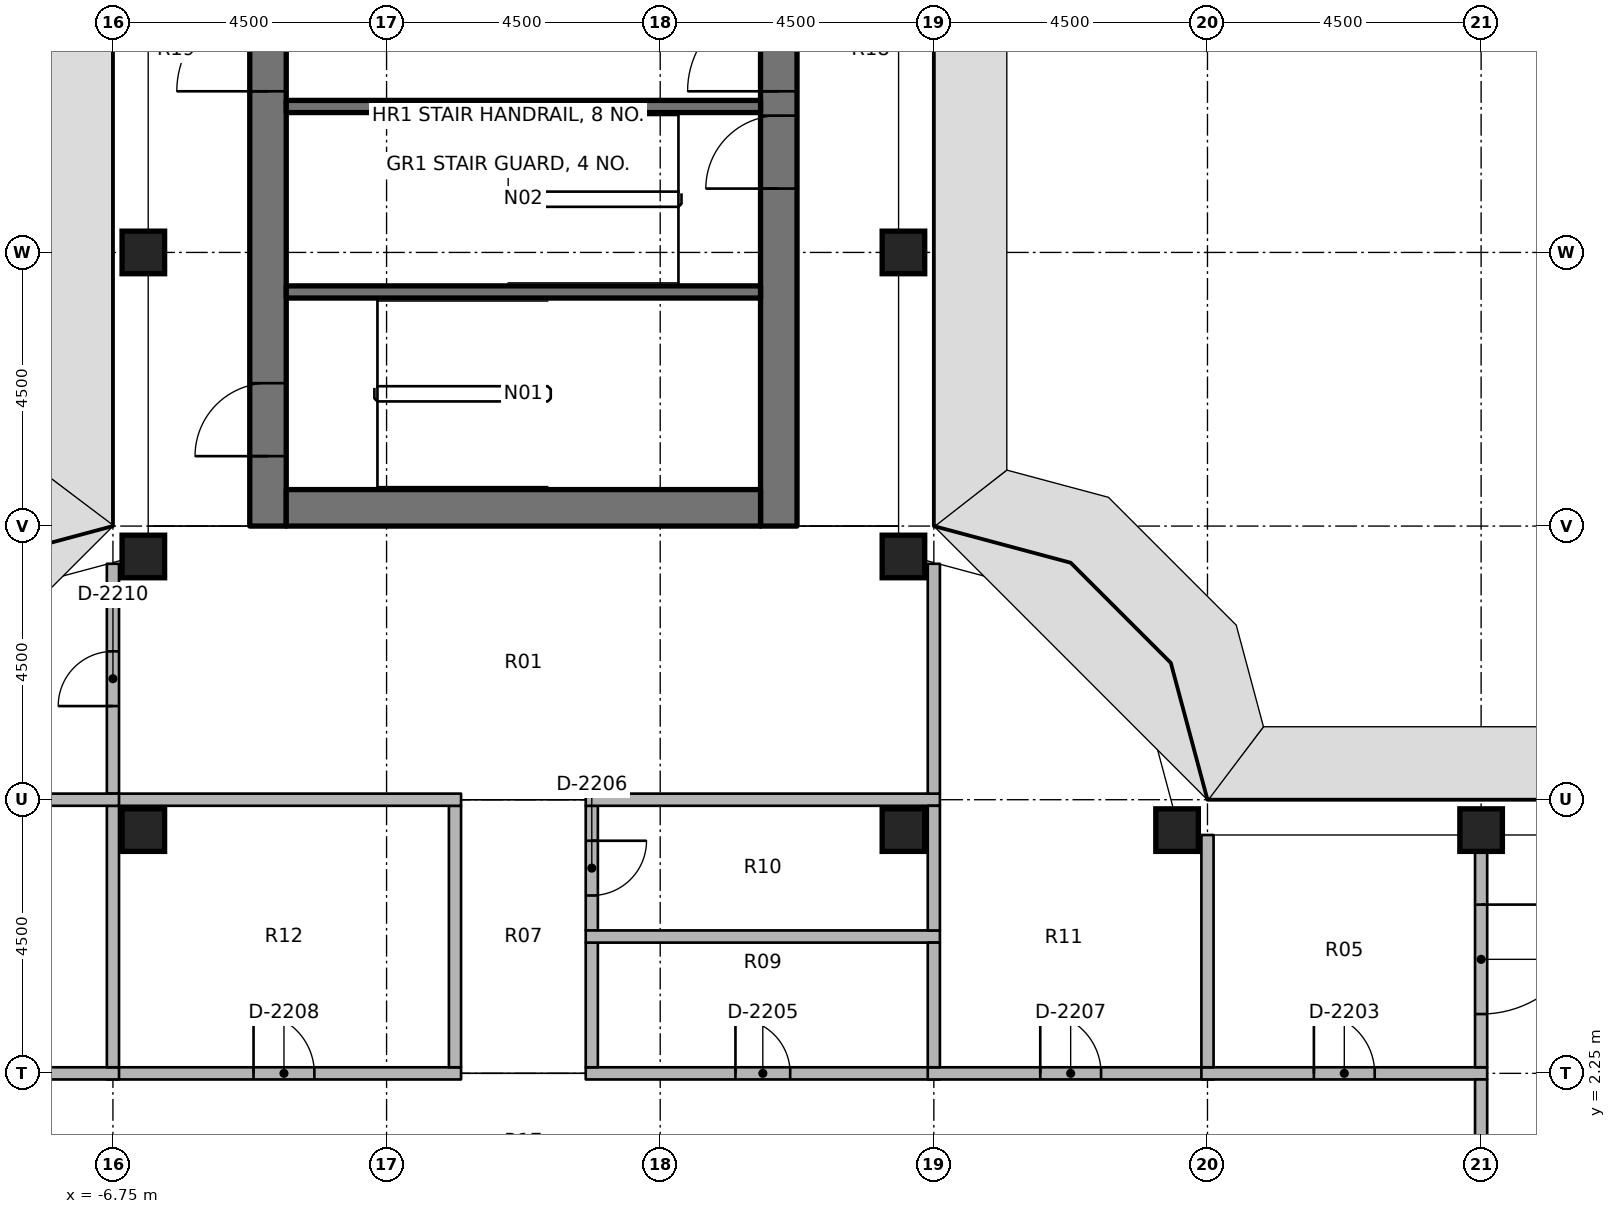
"""IFC4 building model, lengths in metres.
Left out: names, types, materials, properties, quantities, classifications, styles, units other than length and angle.
Written with IfcOpenShell. Run it as: python <this file> out.ifc"""

import sys

from ifc_helpers import new_model, si_unit, direction, frame, frame_2d, origin, origin_2d, place, context, subcontext, project, spatial, rectangle, extrude, element, fill, save


model = new_model("IFC4")
c1 = context("Model", 3, precision=1e-05, world=origin(), true_north=direction((0.0, 1.0)))
c2 = subcontext(c1, "Body", "Model", "MODEL_VIEW")
j1 = project(units=[si_unit("LENGTHUNIT", "METRE"), si_unit("PLANEANGLEUNIT", "RADIAN")], contexts=[c1])
p1 = place(None, origin())
s1 = spatial("IfcSite", under=j1, at=p1, CompositionType="ELEMENT")
p2 = place(p1, origin())
s2 = spatial("IfcBuilding", under=s1, at=p2, CompositionType="ELEMENT")
p3 = place(p2, frame((0.0, 0.0, 206.8)))
s3 = spatial("IfcBuildingStorey", under=s2, at=p3, CompositionType="ELEMENT", Elevation=206.8)
for number, where, z_axis, x_axis in (
    (1, (-6.25, 6.25, 0.0), (0.0, 0.0, 1.0), (1.0, 0.0, 0.0)),
    (2, (-6.25, 10.75, 0.0), (0.0, 0.0, 1.0), (1.0, 0.0, 0.0)),
    (3, (-6.25, 15.75, 0.0), (0.0, 0.0, 1.0), (1.0, 0.0, 0.0)),
    (4, (6.25, 6.25, 0.0), (0.0, 0.0, 1.0), (1.0, 0.0, 0.0)),
    (5, (6.25, 10.75, 0.0), (0.0, 0.0, 1.0), (1.0, 0.0, 0.0)),
    (6, (6.25, 15.75, 0.0), (0.0, 0.0, 1.0), (1.0, 0.0, 0.0)),
    (7, (10.75, 6.25, 0.0), (0.0, 0.0, 1.0), (1.0, 0.0, 0.0)),
    (8, (15.75, 6.25, 0.0), (0.0, 0.0, 1.0), (1.0, 0.0, 0.0)),
):
    element("IfcColumn", number, at=place(p3, frame(where, z_axis=z_axis, x_axis=x_axis)), inside=s3, PredefinedType="COLUMN", context=c2, shape_type="SweptSolid", body=[
        extrude(rectangle(XDim=0.7, YDim=0.7, at=origin_2d()), origin(), (0.0, 0.0, 1.0), 3.65),
    ])
p4 = place(p3, frame((-4.2, 11.25, 0.0), z_axis=(0.0, 0.0, 1.0), x_axis=(0.0, 1.0, 0.0)))
e9 = element("IfcWall", 9, at=p4, inside=s3, PredefinedType="SHEAR", context=c2, shape_type="SweptSolid", body=[
    extrude(rectangle(XDim=15.0, YDim=0.6, at=frame_2d((7.5, 0.0))), origin(), (0.0, 0.0, 1.0), 3.8),
])
p5 = place(p4, frame((7.15, 0.0, 0.0)))
e10 = element("IfcOpeningElement", 10, at=p5, cuts=e9, PredefinedType="OPENING", context=c2, shape_type="SweptSolid", body=[
    extrude(rectangle(XDim=1.5, YDim=2.3, at=frame_2d((0.75, 1.15))), frame((0.0, 0.31, 0.0), z_axis=(0.0, -1.0, 0.0), x_axis=(1.0, 0.0, 0.0)), (0.0, 0.0, 1.0), 0.62),
])
p6 = place(p4, frame((13.9, 0.0, 0.0)))
e11 = element("IfcOpeningElement", 11, at=p6, cuts=e9, PredefinedType="OPENING", context=c2, shape_type="SweptSolid", body=[
    extrude(rectangle(XDim=0.9, YDim=2.1, at=frame_2d((0.45, 1.05))), frame((0.0, 0.31, 0.0), z_axis=(0.0, -1.0, 0.0), x_axis=(1.0, 0.0, 0.0)), (0.0, 0.0, 1.0), 0.62),
])
p7 = place(p4, frame((1.15, 0.0, 0.0)))
e12 = element("IfcOpeningElement", 12, at=p7, cuts=e9, PredefinedType="OPENING", context=c2, shape_type="SweptSolid", body=[
    extrude(rectangle(XDim=1.2, YDim=2.1, at=frame_2d((0.6, 1.05))), frame((0.0, 0.31, 0.0), z_axis=(0.0, -1.0, 0.0), x_axis=(1.0, 0.0, 0.0)), (0.0, 0.0, 1.0), 0.62),
])
p8 = place(p3, frame((4.2, 11.25, 0.0), z_axis=(0.0, 0.0, 1.0), x_axis=(0.0, 1.0, 0.0)))
e13 = element("IfcWall", 13, at=p8, inside=s3, PredefinedType="SHEAR", context=c2, shape_type="SweptSolid", body=[
    extrude(rectangle(XDim=15.0, YDim=0.6, at=frame_2d((7.5, 0.0))), origin(), (0.0, 0.0, 1.0), 3.8),
])
p9 = place(p8, frame((7.15, 0.0, 0.0)))
e14 = element("IfcOpeningElement", 14, at=p9, cuts=e13, PredefinedType="OPENING", context=c2, shape_type="SweptSolid", body=[
    extrude(rectangle(XDim=1.5, YDim=2.3, at=frame_2d((0.75, 1.15))), frame((0.0, 0.31, 0.0), z_axis=(0.0, -1.0, 0.0), x_axis=(1.0, 0.0, 0.0)), (0.0, 0.0, 1.0), 0.62),
])
p10 = place(p8, frame((5.55, 0.0, 0.0)))
e15 = element("IfcOpeningElement", 15, at=p10, cuts=e13, PredefinedType="OPENING", context=c2, shape_type="SweptSolid", body=[
    extrude(rectangle(XDim=1.2, YDim=2.1, at=frame_2d((0.6, 1.05))), frame((0.0, 0.31, 0.0), z_axis=(0.0, -1.0, 0.0), x_axis=(1.0, 0.0, 0.0)), (0.0, 0.0, 1.0), 0.62),
])
p11 = place(p3, frame((-3.9, 11.55, 0.0), z_axis=(0.0, 0.0, 1.0), x_axis=(1.0, 0.0, 0.0)))
e16 = element("IfcWall", 16, at=p11, inside=s3, PredefinedType="SHEAR", context=c2, shape_type="SweptSolid", body=[
    extrude(rectangle(XDim=7.8, YDim=0.6, at=frame_2d((3.9, 0.0))), origin(), (0.0, 0.0, 1.0), 3.8),
])
for number, where, z_axis, x_axis in (
    (17, (-3.9, 18.15, 0.0), (0.0, 0.0, 1.0), (1.0, 0.0, 0.0)),
    (18, (-3.9, 15.1, 0.0), (0.0, 0.0, 1.0), (1.0, 0.0, 0.0)),
):
    element("IfcWall", number, at=place(p3, frame(where, z_axis=z_axis, x_axis=x_axis)), inside=s3, PredefinedType="SHEAR", context=c2, shape_type="SweptSolid", body=[
        extrude(rectangle(XDim=7.8, YDim=0.2, at=frame_2d((3.9, 0.0))), origin(), (0.0, 0.0, 1.0), 3.65),
    ])
p12 = place(p3, frame((1.025, 2.25, 0.0), z_axis=(0.0, 0.0, 1.0), x_axis=(1.0, 0.0, 0.0)))
e19 = element("IfcWall", 19, at=p12, inside=s3, PredefinedType="PARTITIONING", context=c2, shape_type="SweptSolid", body=[
    extrude(rectangle(XDim=5.825, YDim=0.2, at=frame_2d((2.913, 0.0))), origin(), (0.0, 0.0, 1.0), 2.75),
])
p13 = place(p12, frame((2.462, 0.0, 0.0)))
e20 = element("IfcOpeningElement", 20, at=p13, cuts=e19, PredefinedType="OPENING", context=c2, shape_type="SweptSolid", body=[
    extrude(rectangle(XDim=0.9, YDim=2.1, at=frame_2d((0.45, 1.05))), frame((0.0, 0.11, 0.0), z_axis=(0.0, -1.0, 0.0), x_axis=(1.0, 0.0, 0.0)), (0.0, 0.0, 1.0), 0.22),
])
p14 = place(p3, frame((6.65, 2.25, 0.0), z_axis=(0.0, 0.0, 1.0), x_axis=(1.0, 0.0, 0.0)))
e21 = element("IfcWall", 21, at=p14, inside=s3, PredefinedType="PARTITIONING", context=c2, shape_type="SweptSolid", body=[
    extrude(rectangle(XDim=4.7, YDim=0.2, at=frame_2d((2.35, 0.0))), origin(), (0.0, 0.0, 1.0), 2.75),
])
p15 = place(p14, frame((1.85, 0.0, 0.0)))
e22 = element("IfcOpeningElement", 22, at=p15, cuts=e21, PredefinedType="OPENING", context=c2, shape_type="SweptSolid", body=[
    extrude(rectangle(XDim=1.0, YDim=2.1, at=frame_2d((0.5, 1.05))), frame((0.0, 0.11, 0.0), z_axis=(0.0, -1.0, 0.0), x_axis=(1.0, 0.0, 0.0)), (0.0, 0.0, 1.0), 0.22),
])
p16 = place(p3, frame((-6.85, 2.25, 0.0), z_axis=(0.0, 0.0, 1.0), x_axis=(1.0, 0.0, 0.0)))
e23 = element("IfcWall", 23, at=p16, inside=s3, PredefinedType="PARTITIONING", context=c2, shape_type="SweptSolid", body=[
    extrude(rectangle(XDim=5.825, YDim=0.2, at=frame_2d((2.913, 0.0))), origin(), (0.0, 0.0, 1.0), 2.75),
])
p17 = place(p16, frame((2.413, 0.0, 0.0)))
e24 = element("IfcOpeningElement", 24, at=p17, cuts=e23, PredefinedType="OPENING", context=c2, shape_type="SweptSolid", body=[
    extrude(rectangle(XDim=1.0, YDim=2.1, at=frame_2d((0.5, 1.05))), frame((0.0, 0.11, 0.0), z_axis=(0.0, -1.0, 0.0), x_axis=(1.0, 0.0, 0.0)), (0.0, 0.0, 1.0), 0.22),
])
p18 = place(p3, frame((-11.35, 2.25, 0.0), z_axis=(0.0, 0.0, 1.0), x_axis=(1.0, 0.0, 0.0)))
e25 = element("IfcWall", 25, at=p18, inside=s3, PredefinedType="PARTITIONING", context=c2, shape_type="SweptSolid", body=[
    extrude(rectangle(XDim=4.7, YDim=0.2, at=frame_2d((2.35, 0.0))), origin(), (0.0, 0.0, 1.0), 2.75),
])
p19 = place(p18, frame((1.85, 0.0, 0.0)))
e26 = element("IfcOpeningElement", 26, at=p19, cuts=e25, PredefinedType="OPENING", context=c2, shape_type="SweptSolid", body=[
    extrude(rectangle(XDim=1.0, YDim=2.1, at=frame_2d((0.5, 1.05))), frame((0.0, 0.11, 0.0), z_axis=(0.0, -1.0, 0.0), x_axis=(1.0, 0.0, 0.0)), (0.0, 0.0, 1.0), 0.22),
])
p20 = place(p3, frame((11.15, 2.25, 0.0), z_axis=(0.0, 0.0, 1.0), x_axis=(1.0, 0.0, 0.0)))
e27 = element("IfcWall", 27, at=p20, inside=s3, PredefinedType="PARTITIONING", context=c2, shape_type="SweptSolid", body=[
    extrude(rectangle(XDim=4.7, YDim=0.2, at=frame_2d((2.35, 0.0))), origin(), (0.0, 0.0, 1.0), 2.75),
])
p21 = place(p20, frame((1.85, 0.0, 0.0)))
e28 = element("IfcOpeningElement", 28, at=p21, cuts=e27, PredefinedType="OPENING", context=c2, shape_type="SweptSolid", body=[
    extrude(rectangle(XDim=1.0, YDim=2.1, at=frame_2d((0.5, 1.05))), frame((0.0, 0.11, 0.0), z_axis=(0.0, -1.0, 0.0), x_axis=(1.0, 0.0, 0.0)), (0.0, 0.0, 1.0), 0.22),
])
for number, where, z_axis, x_axis in (
    (29, (15.75, 0.1, 0.0), (0.0, 0.0, 1.0), (0.0, 1.0, 0.0)),
    (30, (1.125, 2.35, 0.0), (0.0, 0.0, 1.0), (0.0, 1.0, 0.0)),
):
    element("IfcWall", number, at=place(p3, frame(where, z_axis=z_axis, x_axis=x_axis)), inside=s3, PredefinedType="PARTITIONING", context=c2, shape_type="SweptSolid", body=[
        extrude(rectangle(XDim=2.05, YDim=0.2, at=frame_2d((1.025, 0.0))), origin(), (0.0, 0.0, 1.0), 2.75),
    ])
p22 = place(p3, frame((1.125, 6.65, 0.0), z_axis=(0.0, 0.0, 1.0), x_axis=(0.0, -1.0, 0.0)))
e31 = element("IfcWall", 31, at=p22, inside=s3, PredefinedType="PARTITIONING", context=c2, shape_type="SweptSolid", body=[
    extrude(rectangle(XDim=2.05, YDim=0.2, at=frame_2d((1.025, 0.0))), origin(), (0.0, 0.0, 1.0), 2.75),
])
p23 = place(p22, frame((0.575, 0.0, 0.0)))
e32 = element("IfcOpeningElement", 32, at=p23, cuts=e31, PredefinedType="OPENING", context=c2, shape_type="SweptSolid", body=[
    extrude(rectangle(XDim=0.9, YDim=2.1, at=frame_2d((0.45, 1.05))), frame((0.0, 0.11, 0.0), z_axis=(0.0, -1.0, 0.0), x_axis=(1.0, 0.0, 0.0)), (0.0, 0.0, 1.0), 0.22),
])
p24 = place(p3, frame((-1.125, 2.35, 0.0), z_axis=(0.0, 0.0, 1.0), x_axis=(0.0, 1.0, 0.0)))
e33 = element("IfcWall", 33, at=p24, inside=s3, PredefinedType="PARTITIONING", context=c2, shape_type="SweptSolid", body=[
    extrude(rectangle(XDim=4.3, YDim=0.2, at=frame_2d((2.15, 0.0))), origin(), (0.0, 0.0, 1.0), 2.75),
])
p25 = place(p3, frame((1.025, 6.75, 0.0), z_axis=(0.0, 0.0, 1.0), x_axis=(1.0, 0.0, 0.0)))
e34 = element("IfcWall", 34, at=p25, inside=s3, PredefinedType="PARTITIONING", context=c2, shape_type="SweptSolid", body=[
    extrude(rectangle(XDim=5.825, YDim=0.2, at=frame_2d((2.913, 0.0))), origin(), (0.0, 0.0, 1.0), 2.75),
])
p26 = place(p3, frame((6.75, 6.85, 0.0), z_axis=(0.0, 0.0, 1.0), x_axis=(0.0, 1.0, 0.0)))
e35 = element("IfcWall", 35, at=p26, inside=s3, PredefinedType="PARTITIONING", context=c2, shape_type="SweptSolid", body=[
    extrude(rectangle(XDim=3.78, YDim=0.2, at=frame_2d((1.89, 0.0))), origin(), (0.0, 0.0, 1.0), 2.75),
])
p27 = place(p3, frame((-6.85, 6.75, 0.0), z_axis=(0.0, 0.0, 1.0), x_axis=(1.0, 0.0, 0.0)))
e36 = element("IfcWall", 36, at=p27, inside=s3, PredefinedType="PARTITIONING", context=c2, shape_type="SweptSolid", body=[
    extrude(rectangle(XDim=5.825, YDim=0.2, at=frame_2d((2.913, 0.0))), origin(), (0.0, 0.0, 1.0), 2.75),
])
p28 = place(p3, frame((-6.75, 6.85, 0.0), z_axis=(0.0, 0.0, 1.0), x_axis=(0.0, 1.0, 0.0)))
e37 = element("IfcWall", 37, at=p28, inside=s3, PredefinedType="PARTITIONING", context=c2, shape_type="SweptSolid", body=[
    extrude(rectangle(XDim=3.78, YDim=0.2, at=frame_2d((1.89, 0.0))), origin(), (0.0, 0.0, 1.0), 2.75),
])
p29 = place(p28, frame((1.44, 0.0, 0.0)))
e38 = element("IfcOpeningElement", 38, at=p29, cuts=e37, PredefinedType="OPENING", context=c2, shape_type="SweptSolid", body=[
    extrude(rectangle(XDim=0.9, YDim=2.1, at=frame_2d((0.45, 1.05))), frame((0.0, 0.11, 0.0), z_axis=(0.0, -1.0, 0.0), x_axis=(1.0, 0.0, 0.0)), (0.0, 0.0, 1.0), 0.22),
])
p30 = place(p3, frame((1.025, 4.5, 0.0), z_axis=(0.0, 0.0, 1.0), x_axis=(1.0, 0.0, 0.0)))
e39 = element("IfcWall", 39, at=p30, inside=s3, PredefinedType="PARTITIONING", context=c2, shape_type="SweptSolid", body=[
    extrude(rectangle(XDim=5.825, YDim=0.2, at=frame_2d((2.913, 0.0))), origin(), (0.0, 0.0, 1.0), 2.75),
])
for number, where, z_axis, x_axis in (
    (40, (6.75, 2.35, 0.0), (0.0, 0.0, 1.0), (0.0, 1.0, 0.0)),
    (41, (6.75, 4.6, 0.0), (0.0, 0.0, 1.0), (0.0, 1.0, 0.0)),
):
    element("IfcWall", number, at=place(p3, frame(where, z_axis=z_axis, x_axis=x_axis)), inside=s3, PredefinedType="PARTITIONING", context=c2, shape_type="SweptSolid", body=[
        extrude(rectangle(XDim=2.05, YDim=0.2, at=frame_2d((1.025, 0.0))), origin(), (0.0, 0.0, 1.0), 2.75),
    ])
p31 = place(p3, frame((11.25, 2.35, 0.0), z_axis=(0.0, 0.0, 1.0), x_axis=(0.0, 1.0, 0.0)))
e42 = element("IfcWall", 42, at=p31, inside=s3, PredefinedType="PARTITIONING", context=c2, shape_type="SweptSolid", body=[
    extrude(rectangle(XDim=3.82, YDim=0.2, at=frame_2d((1.91, 0.0))), origin(), (0.0, 0.0, 1.0), 2.75),
])
p32 = place(p3, frame((-6.75, 2.35, 0.0), z_axis=(0.0, 0.0, 1.0), x_axis=(0.0, 1.0, 0.0)))
e43 = element("IfcWall", 43, at=p32, inside=s3, PredefinedType="PARTITIONING", context=c2, shape_type="SweptSolid", body=[
    extrude(rectangle(XDim=4.3, YDim=0.2, at=frame_2d((2.15, 0.0))), origin(), (0.0, 0.0, 1.0), 2.75),
])
p33 = place(p3, frame((-11.35, 6.75, 0.0), z_axis=(0.0, 0.0, 1.0), x_axis=(1.0, 0.0, 0.0)))
e44 = element("IfcWall", 44, at=p33, inside=s3, PredefinedType="PARTITIONING", context=c2, shape_type="SweptSolid", body=[
    extrude(rectangle(XDim=4.7, YDim=0.2, at=frame_2d((2.35, 0.0))), origin(), (0.0, 0.0, 1.0), 2.75),
])
p34 = place(p3, frame((15.75, 5.9, 0.0), z_axis=(0.0, 0.0, 1.0), x_axis=(0.0, -1.0, 0.0)))
e45 = element("IfcWall", 45, at=p34, inside=s3, PredefinedType="PARTITIONING", context=c2, shape_type="SweptSolid", body=[
    extrude(rectangle(XDim=3.55, YDim=0.2, at=frame_2d((1.775, 0.0))), origin(), (0.0, 0.0, 1.0), 2.75),
])
p35 = place(p34, frame((0.875, 0.0, 0.0)))
e46 = element("IfcOpeningElement", 46, at=p35, cuts=e45, PredefinedType="OPENING", context=c2, shape_type="SweptSolid", body=[
    extrude(rectangle(XDim=1.8, YDim=2.1, at=frame_2d((0.9, 1.05))), frame((0.0, 0.11, 0.0), z_axis=(0.0, -1.0, 0.0), x_axis=(1.0, 0.0, 0.0)), (0.0, 0.0, 1.0), 0.22),
])
p36 = place(p5, origin())
e47 = element("IfcDoor", 47, at=p36, inside=s3, OperationType="DOUBLE_DOOR_SINGLE_SWING", PredefinedType="DOOR", context=c2, shape_type="SweptSolid", body=[
    extrude(rectangle(XDim=1.5, YDim=2.3, at=frame_2d((0.75, 1.15))), frame((0.0, 0.025, 0.0), z_axis=(0.0, -1.0, 0.0), x_axis=(1.0, 0.0, 0.0)), (0.0, 0.0, 1.0), 0.05),
])
fill(e10, e47)
p37 = place(p9, origin())
e48 = element("IfcDoor", 48, at=p37, inside=s3, OperationType="DOUBLE_DOOR_SINGLE_SWING", PredefinedType="DOOR", context=c2, shape_type="SweptSolid", body=[
    extrude(rectangle(XDim=1.5, YDim=2.3, at=frame_2d((0.75, 1.15))), frame((0.0, 0.025, 0.0), z_axis=(0.0, -1.0, 0.0), x_axis=(1.0, 0.0, 0.0)), (0.0, 0.0, 1.0), 0.05),
])
fill(e14, e48)
p38 = place(p10, origin())
e49 = element("IfcDoor", 49, at=p38, inside=s3, OperationType="SINGLE_SWING_RIGHT", PredefinedType="DOOR", context=c2, shape_type="SweptSolid", body=[
    extrude(rectangle(XDim=1.2, YDim=2.1, at=frame_2d((0.6, 1.05))), frame((0.0, 0.025, 0.0), z_axis=(0.0, -1.0, 0.0), x_axis=(1.0, 0.0, 0.0)), (0.0, 0.0, 1.0), 0.05),
])
fill(e15, e49)
p39 = place(p7, origin())
e50 = element("IfcDoor", 50, at=p39, inside=s3, OperationType="SINGLE_SWING_LEFT", PredefinedType="DOOR", context=c2, shape_type="SweptSolid", body=[
    extrude(rectangle(XDim=1.2, YDim=2.1, at=frame_2d((0.6, 1.05))), frame((0.0, 0.025, 0.0), z_axis=(0.0, -1.0, 0.0), x_axis=(1.0, 0.0, 0.0)), (0.0, 0.0, 1.0), 0.05),
])
fill(e12, e50)
p40 = place(p35, origin())
e51 = element("IfcDoor", 51, at=p40, inside=s3, OperationType="DOUBLE_DOOR_SINGLE_SWING", PredefinedType="DOOR", context=c2, shape_type="SweptSolid", body=[
    extrude(rectangle(XDim=1.8, YDim=2.1, at=frame_2d((0.9, 1.05))), frame((0.0, 0.025, 0.0), z_axis=(0.0, -1.0, 0.0), x_axis=(1.0, 0.0, 0.0)), (0.0, 0.0, 1.0), 0.05),
])
fill(e46, e51)
p41 = place(p21, origin())
e52 = element("IfcDoor", 52, at=p41, inside=s3, OperationType="SINGLE_SWING_RIGHT", PredefinedType="DOOR", context=c2, shape_type="SweptSolid", body=[
    extrude(rectangle(XDim=1.0, YDim=2.1, at=frame_2d((0.5, 1.05))), frame((0.0, 0.025, 0.0), z_axis=(0.0, -1.0, 0.0), x_axis=(1.0, 0.0, 0.0)), (0.0, 0.0, 1.0), 0.05),
])
fill(e28, e52)
p42 = place(p13, origin())
e53 = element("IfcDoor", 53, at=p42, inside=s3, OperationType="SINGLE_SWING_RIGHT", PredefinedType="DOOR", context=c2, shape_type="SweptSolid", body=[
    extrude(rectangle(XDim=0.9, YDim=2.1, at=frame_2d((0.45, 1.05))), frame((0.0, 0.025, 0.0), z_axis=(0.0, -1.0, 0.0), x_axis=(1.0, 0.0, 0.0)), (0.0, 0.0, 1.0), 0.05),
])
fill(e20, e53)
p43 = place(p23, origin())
e54 = element("IfcDoor", 54, at=p43, inside=s3, OperationType="SINGLE_SWING_RIGHT", PredefinedType="DOOR", context=c2, shape_type="SweptSolid", body=[
    extrude(rectangle(XDim=0.9, YDim=2.1, at=frame_2d((0.45, 1.05))), frame((0.0, 0.025, 0.0), z_axis=(0.0, -1.0, 0.0), x_axis=(1.0, 0.0, 0.0)), (0.0, 0.0, 1.0), 0.05),
])
fill(e32, e54)
p44 = place(p15, origin())
e55 = element("IfcDoor", 55, at=p44, inside=s3, OperationType="SINGLE_SWING_RIGHT", PredefinedType="DOOR", context=c2, shape_type="SweptSolid", body=[
    extrude(rectangle(XDim=1.0, YDim=2.1, at=frame_2d((0.5, 1.05))), frame((0.0, 0.025, 0.0), z_axis=(0.0, -1.0, 0.0), x_axis=(1.0, 0.0, 0.0)), (0.0, 0.0, 1.0), 0.05),
])
fill(e22, e55)
p45 = place(p17, origin())
e56 = element("IfcDoor", 56, at=p45, inside=s3, OperationType="SINGLE_SWING_RIGHT", PredefinedType="DOOR", context=c2, shape_type="SweptSolid", body=[
    extrude(rectangle(XDim=1.0, YDim=2.1, at=frame_2d((0.5, 1.05))), frame((0.0, 0.025, 0.0), z_axis=(0.0, -1.0, 0.0), x_axis=(1.0, 0.0, 0.0)), (0.0, 0.0, 1.0), 0.05),
])
fill(e24, e56)
p46 = place(p29, origin())
e57 = element("IfcDoor", 57, at=p46, inside=s3, OperationType="SINGLE_SWING_LEFT", PredefinedType="DOOR", context=c2, shape_type="SweptSolid", body=[
    extrude(rectangle(XDim=0.9, YDim=2.1, at=frame_2d((0.45, 1.05))), frame((0.0, 0.025, 0.0), z_axis=(0.0, -1.0, 0.0), x_axis=(1.0, 0.0, 0.0)), (0.0, 0.0, 1.0), 0.05),
])
fill(e38, e57)
save(model, sys.argv[1])
